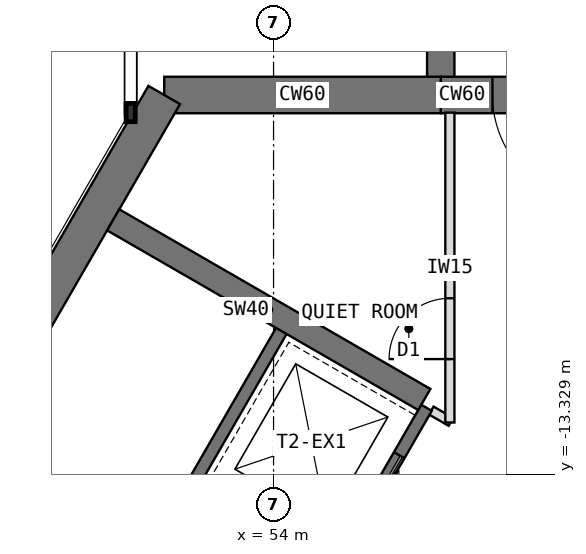
"""IFC4 building model, lengths in metres.
Left out: names, types, materials, properties, quantities, classifications, styles, units other than length and angle.
Written with IfcOpenShell. Run it as: python <this file> out.ifc"""

import sys

from ifc_helpers import new_model, si_unit, direction, frame, frame_2d, origin, place, context, subcontext, project, spatial, rectangle, extrude, element, fill, save


model = new_model("IFC4")
c1 = context("Model", 3, precision=1e-05, world=origin(), true_north=direction((0.0, 1.0)))
c2 = subcontext(c1, "Body", "Model", "MODEL_VIEW")
j1 = project(units=[si_unit("LENGTHUNIT", "METRE"), si_unit("PLANEANGLEUNIT", "RADIAN")], contexts=[c1])
p1 = place(None, origin())
s1 = spatial("IfcSite", under=j1, at=p1, CompositionType="ELEMENT")
p2 = place(p1, origin())
s2 = spatial("IfcBuilding", under=s1, at=p2, CompositionType="ELEMENT")
p3 = place(p2, frame((0.0, 0.0, 97.5)))
s3 = spatial("IfcBuildingStorey", under=s2, at=p3, CompositionType="ELEMENT", Elevation=97.5)
p4 = place(p3, frame((60.25, -7.092, 0.0), z_axis=(0.0, 0.0, 1.0), x_axis=(-1.0, 0.0, 0.0)))
e1 = element("IfcWall", 1, at=p4, inside=s3, PredefinedType="SHEAR", context=c2, shape_type="SweptSolid", body=[
    extrude(rectangle(XDim=3.5, YDim=0.6, at=frame_2d((1.75, 0.0))), origin(), (0.0, 0.0, 1.0), 4.0),
])
p5 = place(p4, frame((0.85, 0.0, 0.0)))
e2 = element("IfcOpeningElement", 2, at=p5, cuts=e1, PredefinedType="OPENING", context=c2, shape_type="SweptSolid", body=[
    extrude(rectangle(XDim=1.8, YDim=2.1, at=frame_2d((0.9, 1.05))), frame((0.0, 0.31, 0.0), z_axis=(0.0, -1.0, 0.0), x_axis=(1.0, 0.0, 0.0)), (0.0, 0.0, 1.0), 0.62),
])
p6 = place(p3, frame((56.75, -7.092, 0.0), z_axis=(0.0, 0.0, 1.0), x_axis=(-1.0, 0.0, 0.0)))
e3 = element("IfcWall", 3, at=p6, inside=s3, PredefinedType="SHEAR", context=c2, shape_type="SweptSolid", body=[
    extrude(rectangle(XDim=4.548, YDim=0.6, at=frame_2d((2.274, 0.0))), origin(), (0.0, 0.0, 1.0), 4.0),
])
p7 = place(p3, frame((52.202, -7.092, 0.0), z_axis=(0.0, 0.0, 1.0), x_axis=(-0.500005998175, -0.866021940709, 0.0)))
e4 = element("IfcWall", 4, at=p7, inside=s3, PredefinedType="SHEAR", context=c2, shape_type="SweptSolid", body=[
    extrude(rectangle(XDim=12.596, YDim=0.6, at=frame_2d((6.298, 0.0))), origin(), (0.0, 0.0, 1.0), 4.0),
])
p8 = place(p3, frame((56.75, -7.092, 0.0), z_axis=(0.0, 0.0, 1.0), x_axis=(0.0, 1.0, 0.0)))
e5 = element("IfcWall", 5, at=p8, inside=s3, PredefinedType="SHEAR", context=c2, shape_type="SweptSolid", body=[
    extrude(rectangle(XDim=2.592, YDim=0.45, at=frame_2d((1.296, 0.0))), origin(), (0.0, 0.0, 1.0), 4.0),
])
p9 = place(p3, frame((56.516, -12.236, 0.0), z_axis=(0.0, 0.0, 1.0), x_axis=(-0.49999894854, -0.866026010844, 0.0)))
e6 = element("IfcWall", 6, at=p9, inside=s3, PredefinedType="SHEAR", context=c2, shape_type="SweptSolid", body=[
    extrude(rectangle(XDim=8.0, YDim=0.2, at=frame_2d((4.0, 0.0))), origin(), (0.0, 0.0, 1.0), 4.0),
])
p10 = place(p9, frame((6.3, 0.0, 0.0)))
e7 = element("IfcOpeningElement", 7, at=p10, cuts=e6, PredefinedType="OPENING", context=c2, shape_type="SweptSolid", body=[
    extrude(rectangle(XDim=1.2, YDim=2.1, at=frame_2d((0.6, 1.05))), frame((0.0, 0.11, 0.0), z_axis=(0.0, -1.0, 0.0), x_axis=(1.0, 0.0, 0.0)), (0.0, 0.0, 1.0), 0.22),
])
p11 = place(p9, frame((0.9, 0.0, 0.0)))
e8 = element("IfcOpeningElement", 8, at=p11, cuts=e6, PredefinedType="OPENING", context=c2, shape_type="SweptSolid", body=[
    extrude(rectangle(XDim=1.1, YDim=2.2, at=frame_2d((0.55, 1.1))), frame((0.0, 0.11, 0.0), z_axis=(0.0, -1.0, 0.0), x_axis=(1.0, 0.0, 0.0)), (0.0, 0.0, 1.0), 0.22),
])
p12 = place(p9, frame((3.8, 0.0, 0.0)))
e9 = element("IfcOpeningElement", 9, at=p12, cuts=e6, PredefinedType="OPENING", context=c2, shape_type="SweptSolid", body=[
    extrude(rectangle(XDim=1.1, YDim=2.2, at=frame_2d((0.55, 1.1))), frame((0.0, 0.11, 0.0), z_axis=(0.0, -1.0, 0.0), x_axis=(1.0, 0.0, 0.0)), (0.0, 0.0, 1.0), 0.22),
])
p13 = place(p3, frame((54.98, -14.697, 0.0), z_axis=(0.0, 0.0, 1.0), x_axis=(-0.866062058628, 0.499936506574, 0.0)))
e10 = element("IfcWall", 10, at=p13, inside=s3, PredefinedType="SHEAR", context=c2, shape_type="SweptSolid", body=[
    extrude(rectangle(XDim=2.6, YDim=0.2, at=frame_2d((1.3, 0.0))), origin(), (0.0, 0.0, 1.0), 4.0),
])
p14 = place(p3, frame((54.178, -10.886, 0.0), z_axis=(0.0, 0.0, 1.0), x_axis=(-0.49999894854, -0.866026010844, 0.0)))
e11 = element("IfcWall", 11, at=p14, inside=s3, PredefinedType="SHEAR", context=c2, shape_type="SweptSolid", body=[
    extrude(rectangle(XDim=8.0, YDim=0.2, at=frame_2d((4.0, 0.0))), origin(), (0.0, 0.0, 1.0), 4.0),
])
p15 = place(p14, frame((6.8, 0.0, 0.0)))
e12 = element("IfcOpeningElement", 12, at=p15, cuts=e11, PredefinedType="OPENING", context=c2, shape_type="SweptSolid", body=[
    extrude(rectangle(XDim=0.9, YDim=2.1, at=frame_2d((0.45, 1.05))), frame((0.0, 0.11, 0.0), z_axis=(0.0, -1.0, 0.0), x_axis=(1.0, 0.0, 0.0)), (0.0, 0.0, 1.0), 0.22),
])
p16 = place(p3, frame((56.48, -12.099, 0.0), z_axis=(0.0, 0.0, 1.0), x_axis=(-0.866009424208, 0.500027676417, 0.0)))
e13 = element("IfcWall", 13, at=p16, inside=s3, PredefinedType="SHEAR", context=c2, shape_type="SweptSolid", body=[
    extrude(rectangle(XDim=5.908, YDim=0.4, at=frame_2d((2.954, 0.0))), origin(), (0.0, 0.0, 1.0), 4.0),
])
p17 = place(p3, frame((56.594, -12.281, 0.0), z_axis=(0.0, 0.0, 1.0), x_axis=(0.866261881104, -0.499590185398, 0.0)))
e14 = element("IfcWall", 14, at=p17, inside=s3, PredefinedType="PARTITIONING", context=c2, shape_type="SweptSolid", body=[
    extrude(rectangle(XDim=0.373, YDim=0.15, at=frame_2d((0.187, 0.0))), origin(), (0.0, 0.0, 1.0), 3.8),
])
p18 = place(p3, frame((56.9, -12.477, 0.0), z_axis=(0.0, 0.0, 1.0), x_axis=(0.0, 1.0, 0.0)))
e15 = element("IfcWall", 15, at=p18, inside=s3, PredefinedType="PARTITIONING", context=c2, shape_type="SweptSolid", body=[
    extrude(rectangle(XDim=5.096, YDim=0.15, at=frame_2d((2.548, 0.0))), origin(), (0.0, 0.0, 1.0), 3.8),
])
p19 = place(p18, frame((1.043, 0.0, 0.0)))
e16 = element("IfcOpeningElement", 16, at=p19, cuts=e15, PredefinedType="OPENING", context=c2, shape_type="SweptSolid", body=[
    extrude(rectangle(XDim=1.0, YDim=2.1, at=frame_2d((0.5, 1.05))), frame((0.0, 0.085, 0.0), z_axis=(0.0, -1.0, 0.0), x_axis=(1.0, 0.0, 0.0)), (0.0, 0.0, 1.0), 0.17),
])
p20 = place(p11, origin())
e17 = element("IfcDoor", 17, at=p20, inside=s3, OperationType="DOUBLE_DOOR_SLIDING", PredefinedType="DOOR", context=c2, shape_type="SweptSolid", body=[
    extrude(rectangle(XDim=1.1, YDim=2.2, at=frame_2d((0.55, 1.1))), frame((0.0, 0.025, 0.0), z_axis=(0.0, -1.0, 0.0), x_axis=(1.0, 0.0, 0.0)), (0.0, 0.0, 1.0), 0.05),
])
fill(e8, e17)
p21 = place(p5, origin())
e18 = element("IfcDoor", 18, at=p21, inside=s3, OperationType="DOUBLE_DOOR_DOUBLE_SWING", PredefinedType="DOOR", context=c2, shape_type="SweptSolid", body=[
    extrude(rectangle(XDim=1.72, YDim=2.06, at=frame_2d((0.9, 1.03))), frame((0.0, 0.025, 0.0), z_axis=(0.0, -1.0, 0.0), x_axis=(1.0, 0.0, 0.0)), (0.0, 0.0, 1.0), 0.05),
    extrude(rectangle(XDim=0.04, YDim=2.1, at=frame_2d((0.02, 1.05))), frame((0.0, 0.3, 0.0), z_axis=(0.0, -1.0, 0.0), x_axis=(1.0, 0.0, 0.0)), (0.0, 0.0, 1.0), 0.6),
    extrude(rectangle(XDim=0.04, YDim=2.1, at=frame_2d((1.78, 1.05))), frame((0.0, 0.3, 0.0), z_axis=(0.0, -1.0, 0.0), x_axis=(1.0, 0.0, 0.0)), (0.0, 0.0, 1.0), 0.6),
    extrude(rectangle(XDim=1.72, YDim=0.04, at=frame_2d((0.9, 2.08))), frame((0.0, 0.3, 0.0), z_axis=(0.0, -1.0, 0.0), x_axis=(1.0, 0.0, 0.0)), (0.0, 0.0, 1.0), 0.6),
])
fill(e2, e18)
p22 = place(p19, origin())
e19 = element("IfcDoor", 19, at=p22, inside=s3, OperationType="SINGLE_SWING_LEFT", PredefinedType="DOOR", context=c2, shape_type="SweptSolid", body=[
    extrude(rectangle(XDim=1.0, YDim=2.1, at=frame_2d((0.5, 1.05))), frame((0.0, 0.025, 0.0), z_axis=(0.0, -1.0, 0.0), x_axis=(1.0, 0.0, 0.0)), (0.0, 0.0, 1.0), 0.05),
])
fill(e16, e19)
save(model, sys.argv[1])
